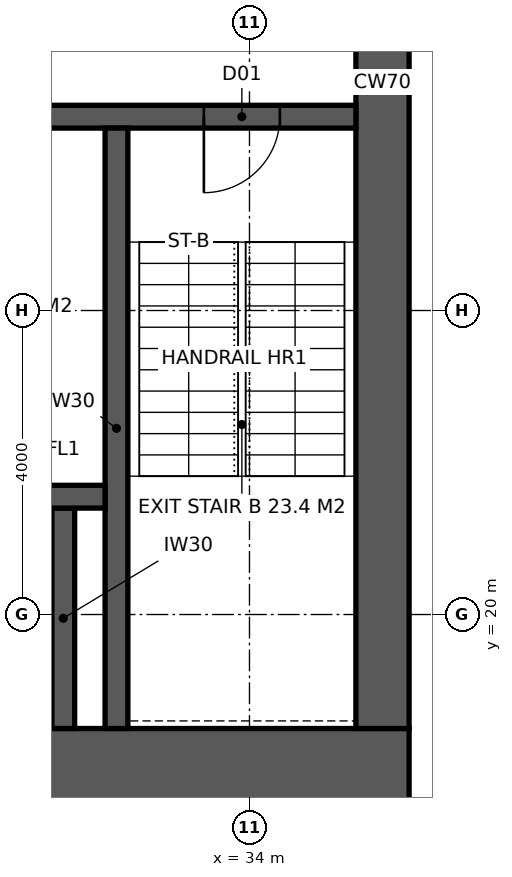
"""IFC4 building model, lengths in metres.
Left out: names, types, materials, properties, quantities, classifications, styles, units other than length and angle.
Written with IfcOpenShell. Run it as: python <this file> out.ifc"""

import sys

from ifc_helpers import new_model, si_unit, direction, frame, frame_2d, origin, place, context, subcontext, project, spatial, rectangle, extrude, element, fill, save


model = new_model("IFC4")
c1 = context("Model", 3, precision=1e-05, world=origin(), true_north=direction((0.0, 1.0)))
c2 = subcontext(c1, "Body", "Model", "MODEL_VIEW")
j1 = project(units=[si_unit("LENGTHUNIT", "METRE"), si_unit("PLANEANGLEUNIT", "RADIAN")], contexts=[c1])
p1 = place(None, origin())
s1 = spatial("IfcSite", under=j1, at=p1, CompositionType="ELEMENT")
p2 = place(p1, origin())
s2 = spatial("IfcBuilding", under=s1, at=p2, CompositionType="ELEMENT")
p3 = place(p2, frame((0.0, 0.0, 226.2)))
s3 = spatial("IfcBuildingStorey", under=s2, at=p3, CompositionType="ELEMENT", Elevation=226.2)
p4 = place(p3, frame((18.5, 18.0, -0.15), z_axis=(0.0, 0.0, 1.0), x_axis=(1.0, 0.0, 0.0)))
e1 = element("IfcWall", 1, at=p4, inside=s3, PredefinedType="SHEAR", context=c2, shape_type="SweptSolid", body=[
    extrude(rectangle(XDim=17.6, YDim=1.0, at=frame_2d((8.8, 0.0))), origin(), (0.0, 0.0, 1.0), 4.0),
])
p5 = place(p4, frame((3.45, 0.0, 0.15)))
e2 = element("IfcOpeningElement", 2, at=p5, cuts=e1, PredefinedType="OPENING", context=c2, shape_type="SweptSolid", body=[
    extrude(rectangle(XDim=1.5, YDim=2.4, at=frame_2d((0.75, 1.2))), frame((0.0, 0.51, 0.0), z_axis=(0.0, -1.0, 0.0), x_axis=(1.0, 0.0, 0.0)), (0.0, 0.0, 1.0), 1.02),
])
p6 = place(p3, frame((35.75, 18.5, -0.15), z_axis=(0.0, 0.0, 1.0), x_axis=(0.0, 1.0, 0.0)))
e3 = element("IfcWall", 3, at=p6, inside=s3, PredefinedType="SHEAR", context=c2, shape_type="SweptSolid", body=[
    extrude(rectangle(XDim=17.0, YDim=0.7, at=frame_2d((8.5, 0.0))), origin(), (0.0, 0.0, 1.0), 4.0),
])
p7 = place(p6, frame((9.85, 0.0, 0.15)))
e4 = element("IfcOpeningElement", 4, at=p7, cuts=e3, PredefinedType="OPENING", context=c2, shape_type="SweptSolid", body=[
    extrude(rectangle(XDim=1.0, YDim=2.2, at=frame_2d((0.5, 1.1))), frame((0.0, 0.36, 0.0), z_axis=(0.0, -1.0, 0.0), x_axis=(1.0, 0.0, 0.0)), (0.0, 0.0, 1.0), 0.72),
])
p8 = place(p3, frame((24.15, 26.55, -0.15), z_axis=(0.0, 0.0, 1.0), x_axis=(1.0, 0.0, 0.0)))
e5 = element("IfcWall", 5, at=p8, inside=s3, PredefinedType="SHEAR", context=c2, shape_type="SweptSolid", body=[
    extrude(rectangle(XDim=11.25, YDim=0.3, at=frame_2d((5.625, 0.0))), origin(), (0.0, 0.0, 1.0), 4.0),
])
p9 = place(p8, frame((9.25, 0.0, 0.15)))
e6 = element("IfcOpeningElement", 6, at=p9, cuts=e5, PredefinedType="OPENING", context=c2, shape_type="SweptSolid", body=[
    extrude(rectangle(XDim=1.0, YDim=2.2, at=frame_2d((0.5, 1.1))), frame((0.0, 0.16, 0.0), z_axis=(0.0, -1.0, 0.0), x_axis=(1.0, 0.0, 0.0)), (0.0, 0.0, 1.0), 0.32),
])
p10 = place(p8, frame((4.9, 0.0, 0.15)))
e7 = element("IfcOpeningElement", 7, at=p10, cuts=e5, PredefinedType="OPENING", context=c2, shape_type="SweptSolid", body=[
    extrude(rectangle(XDim=1.5, YDim=2.4, at=frame_2d((0.75, 1.2))), frame((0.0, 0.16, 0.0), z_axis=(0.0, -1.0, 0.0), x_axis=(1.0, 0.0, 0.0)), (0.0, 0.0, 1.0), 0.32),
])
p11 = place(p3, frame((32.25, 18.5, -0.15), z_axis=(0.0, 0.0, 1.0), x_axis=(0.0, 1.0, 0.0)))
e8 = element("IfcWall", 8, at=p11, inside=s3, PredefinedType="SHEAR", context=c2, shape_type="SweptSolid", body=[
    extrude(rectangle(XDim=7.9, YDim=0.3, at=frame_2d((3.95, 0.0))), origin(), (0.0, 0.0, 1.0), 4.0),
])
p12 = place(p3, frame((31.55, 18.5, -0.15), z_axis=(0.0, 0.0, 1.0), x_axis=(0.0, 1.0, 0.0)))
e9 = element("IfcWall", 9, at=p12, inside=s3, PredefinedType="SHEAR", context=c2, shape_type="SweptSolid", body=[
    extrude(rectangle(XDim=2.9, YDim=0.3, at=frame_2d((1.45, 0.0))), origin(), (0.0, 0.0, 1.0), 4.0),
])
p13 = place(p3, frame((28.3, 21.55, -0.15), z_axis=(0.0, 0.0, 1.0), x_axis=(1.0, 0.0, 0.0)))
e10 = element("IfcWall", 10, at=p13, inside=s3, PredefinedType="SHEAR", context=c2, shape_type="SweptSolid", body=[
    extrude(rectangle(XDim=3.8, YDim=0.3, at=frame_2d((1.9, 0.0))), origin(), (0.0, 0.0, 1.0), 4.0),
])
p14 = place(p13, frame((1.05, 0.0, 0.15)))
e11 = element("IfcOpeningElement", 11, at=p14, cuts=e10, PredefinedType="OPENING", context=c2, shape_type="SweptSolid", body=[
    extrude(rectangle(XDim=1.3, YDim=2.4, at=frame_2d((0.65, 1.2))), frame((0.0, 0.16, 0.0), z_axis=(0.0, -1.0, 0.0), x_axis=(1.0, 0.0, 0.0)), (0.0, 0.0, 1.0), 0.32),
])
p15 = place(p9, frame((1.0, 0.0, 0.0), z_axis=(0.0, 0.0, 1.0), x_axis=(-1.0, 0.0, 0.0)))
e12 = element("IfcDoor", 12, at=p15, inside=s3, OperationType="SINGLE_SWING_RIGHT", PredefinedType="DOOR", context=c2, shape_type="SweptSolid", body=[
    extrude(rectangle(XDim=1.0, YDim=2.2, at=frame_2d((0.5, 1.1))), frame((0.0, 0.025, 0.0), z_axis=(0.0, -1.0, 0.0), x_axis=(1.0, 0.0, 0.0)), (0.0, 0.0, 1.0), 0.05),
])
fill(e6, e12)
save(model, sys.argv[1])
